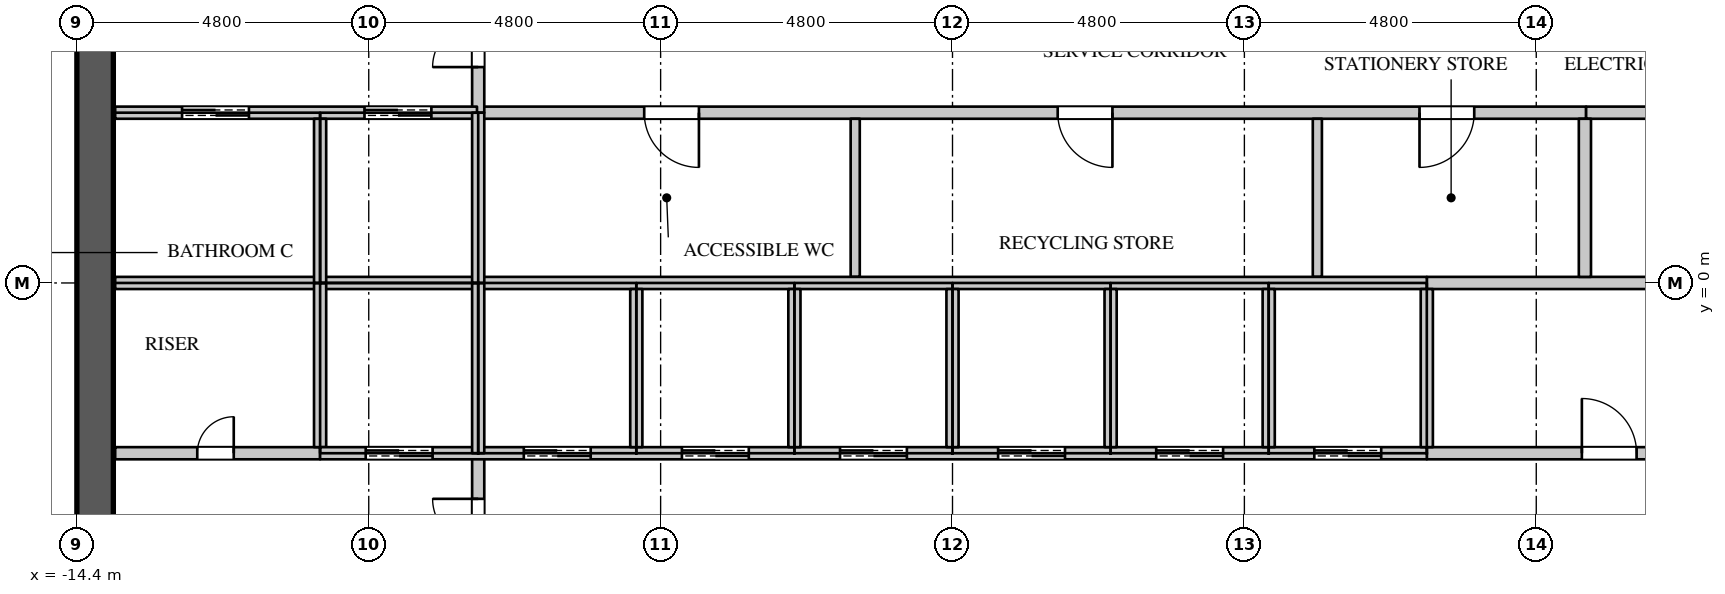
"""IFC4 building model, lengths in metres.
Left out: names, types, materials, properties, quantities, classifications, styles, units other than length and angle.
Written with IfcOpenShell. Run it as: python <this file> out.ifc"""

import sys

from ifc_helpers import new_model, si_unit, direction, frame, frame_2d, origin, place, context, subcontext, project, spatial, rectangle, extrude, element, fill, save


model = new_model("IFC4")
c1 = context("Model", 3, precision=1e-05, world=origin(), true_north=direction((0.0, 1.0)))
c2 = subcontext(c1, "Body", "Model", "MODEL_VIEW")
j1 = project(units=[si_unit("LENGTHUNIT", "METRE"), si_unit("PLANEANGLEUNIT", "RADIAN")], contexts=[c1])
p1 = place(None, origin())
s1 = spatial("IfcSite", under=j1, at=p1, CompositionType="ELEMENT")
p2 = place(p1, origin())
s2 = spatial("IfcBuilding", under=s1, at=p2, CompositionType="ELEMENT")
p3 = place(p2, frame((0.0, 0.0, 293.7)))
s3 = spatial("IfcBuildingStorey", under=s2, at=p3, CompositionType="ELEMENT", Elevation=293.7)
p4 = place(p3, frame((-14.1, -11.4, 0.0), z_axis=(0.0, 0.0, 1.0), x_axis=(0.0, 1.0, 0.0)))
e1 = element("IfcWall", 1, at=p4, inside=s3, PredefinedType="SHEAR", context=c2, shape_type="SweptSolid", body=[
    extrude(rectangle(XDim=22.8, YDim=0.6, at=frame_2d((11.4, 0.0))), origin(), (0.0, 0.0, 1.0), 4.2),
])
p5 = place(p4, frame((20.45, 0.0, 0.0)))
e2 = element("IfcOpeningElement", 2, at=p5, cuts=e1, PredefinedType="OPENING", context=c2, shape_type="SweptSolid", body=[
    extrude(rectangle(XDim=1.1, YDim=2.2, at=frame_2d((0.55, 1.1))), frame((0.0, 0.31, 0.0), z_axis=(0.0, -1.0, 0.0), x_axis=(1.0, 0.0, 0.0)), (0.0, 0.0, 1.0), 0.62),
])
p6 = place(p4, frame((1.25, 0.0, 0.0)))
e3 = element("IfcOpeningElement", 3, at=p6, cuts=e1, PredefinedType="OPENING", context=c2, shape_type="SweptSolid", body=[
    extrude(rectangle(XDim=1.1, YDim=2.2, at=frame_2d((0.55, 1.1))), frame((0.0, 0.31, 0.0), z_axis=(0.0, -1.0, 0.0), x_axis=(1.0, 0.0, 0.0)), (0.0, 0.0, 1.0), 0.62),
])
p7 = place(p4, frame((16.15, 0.0, 0.0)))
e4 = element("IfcOpeningElement", 4, at=p7, cuts=e1, PredefinedType="OPENING", context=c2, shape_type="SweptSolid", body=[
    extrude(rectangle(XDim=1.5, YDim=2.4, at=frame_2d((0.75, 1.2))), frame((0.0, 0.31, 0.0), z_axis=(0.0, -1.0, 0.0), x_axis=(1.0, 0.0, 0.0)), (0.0, 0.0, 1.0), 0.62),
])
p8 = place(p4, frame((5.15, 0.0, 0.0)))
e5 = element("IfcOpeningElement", 5, at=p8, cuts=e1, PredefinedType="OPENING", context=c2, shape_type="SweptSolid", body=[
    extrude(rectangle(XDim=1.5, YDim=2.4, at=frame_2d((0.75, 1.2))), frame((0.0, 0.31, 0.0), z_axis=(0.0, -1.0, 0.0), x_axis=(1.0, 0.0, 0.0)), (0.0, 0.0, 1.0), 0.62),
])
p9 = place(p3, frame((-7.82, 2.8, 0.0), z_axis=(0.0, 0.0, 1.0), x_axis=(1.0, 0.0, 0.0)))
e6 = element("IfcWall", 6, at=p9, inside=s3, PredefinedType="PARTITIONING", context=c2, shape_type="SweptSolid", body=[
    extrude(rectangle(XDim=18.24, YDim=0.2, at=frame_2d((9.12, 0.0))), origin(), (0.0, 0.0, 1.0), 3.95),
])
p10 = place(p9, frame((2.75, 0.0, 0.0)))
e7 = element("IfcOpeningElement", 7, at=p10, cuts=e6, PredefinedType="OPENING", context=c2, shape_type="SweptSolid", body=[
    extrude(rectangle(XDim=0.9, YDim=2.2, at=frame_2d((0.45, 1.1))), frame((0.0, 0.11, 0.0), z_axis=(0.0, -1.0, 0.0), x_axis=(1.0, 0.0, 0.0)), (0.0, 0.0, 1.0), 0.22),
])
p11 = place(p9, frame((9.55, 0.0, 0.0)))
e8 = element("IfcOpeningElement", 8, at=p11, cuts=e6, PredefinedType="OPENING", context=c2, shape_type="SweptSolid", body=[
    extrude(rectangle(XDim=0.9, YDim=2.2, at=frame_2d((0.45, 1.1))), frame((0.0, 0.11, 0.0), z_axis=(0.0, -1.0, 0.0), x_axis=(1.0, 0.0, 0.0)), (0.0, 0.0, 1.0), 0.22),
])
p12 = place(p9, frame((15.5, 0.0, 0.0)))
e9 = element("IfcOpeningElement", 9, at=p12, cuts=e6, PredefinedType="OPENING", context=c2, shape_type="SweptSolid", body=[
    extrude(rectangle(XDim=0.9, YDim=2.2, at=frame_2d((0.45, 1.1))), frame((0.0, 0.11, 0.0), z_axis=(0.0, -1.0, 0.0), x_axis=(1.0, 0.0, 0.0)), (0.0, 0.0, 1.0), 0.22),
])
p13 = place(p3, frame((-7.8, -5.8, 0.0), z_axis=(0.0, 0.0, 1.0), x_axis=(0.0, 1.0, 0.0)))
e10 = element("IfcWall", 10, at=p13, inside=s3, PredefinedType="PARTITIONING", context=c2, shape_type="SweptSolid", body=[
    extrude(rectangle(XDim=3.0, YDim=0.2, at=frame_2d((1.5, 0.0))), origin(), (0.0, 0.0, 1.0), 3.95),
])
p14 = place(p13, frame((0.75, 0.0, 0.0)))
e11 = element("IfcOpeningElement", 11, at=p14, cuts=e10, PredefinedType="OPENING", context=c2, shape_type="SweptSolid", body=[
    extrude(rectangle(XDim=1.5, YDim=2.4, at=frame_2d((0.75, 1.2))), frame((0.0, 0.11, 0.0), z_axis=(0.0, -1.0, 0.0), x_axis=(1.0, 0.0, 0.0)), (0.0, 0.0, 1.0), 0.22),
])
p15 = place(p3, frame((-7.8, 2.8, 0.0), z_axis=(0.0, 0.0, 1.0), x_axis=(0.0, 1.0, 0.0)))
e12 = element("IfcWall", 12, at=p15, inside=s3, PredefinedType="PARTITIONING", context=c2, shape_type="SweptSolid", body=[
    extrude(rectangle(XDim=5.275, YDim=0.2, at=frame_2d((2.637, 0.0))), origin(), (0.0, 0.0, 1.0), 3.95),
])
p16 = place(p15, frame((0.75, 0.0, 0.0)))
e13 = element("IfcOpeningElement", 13, at=p16, cuts=e12, PredefinedType="OPENING", context=c2, shape_type="SweptSolid", body=[
    extrude(rectangle(XDim=1.5, YDim=2.4, at=frame_2d((0.75, 1.2))), frame((0.0, 0.11, 0.0), z_axis=(0.0, -1.0, 0.0), x_axis=(1.0, 0.0, 0.0)), (0.0, 0.0, 1.0), 0.22),
])
for number, where, z_axis, x_axis in (
    (14, (-1.6, 0.1, 0.0), (0.0, 0.0, 1.0), (0.0, 1.0, 0.0)),
    (15, (6.0, 0.1, 0.0), (0.0, 0.0, 1.0), (0.0, 1.0, 0.0)),
):
    element("IfcWall", number, at=place(p3, frame(where, z_axis=z_axis, x_axis=x_axis)), inside=s3, PredefinedType="PARTITIONING", context=c2, shape_type="SweptSolid", body=[
        extrude(rectangle(XDim=2.6, YDim=0.15, at=frame_2d((1.3, 0.0))), origin(), (0.0, 0.0, 1.0), 3.95),
    ])
p17 = place(p3, frame((-13.77, -2.8, 0.0), z_axis=(0.0, 0.0, 1.0), x_axis=(1.0, 0.0, 0.0)))
e16 = element("IfcWall", 16, at=p17, inside=s3, PredefinedType="PARTITIONING", context=c2, shape_type="SweptSolid", body=[
    extrude(rectangle(XDim=3.37, YDim=0.2, at=frame_2d((1.685, 0.0))), origin(), (0.0, 0.0, 1.0), 3.95),
])
p18 = place(p17, frame((1.35, 0.0, 0.0)))
e17 = element("IfcOpeningElement", 17, at=p18, cuts=e16, PredefinedType="OPENING", context=c2, shape_type="SweptSolid", body=[
    extrude(rectangle(XDim=0.6, YDim=2.0, at=frame_2d((0.3, 1.0))), frame((0.0, 0.11, 0.0), z_axis=(0.0, -1.0, 0.0), x_axis=(1.0, 0.0, 0.0)), (0.0, 0.0, 1.0), 0.22),
])
p19 = place(p3, frame((7.8, -2.8, 0.0), z_axis=(0.0, 0.0, 1.0), x_axis=(1.0, 0.0, 0.0)))
e18 = element("IfcWall", 18, at=p19, inside=s3, PredefinedType="PARTITIONING", context=c2, shape_type="SweptSolid", body=[
    extrude(rectangle(XDim=5.97, YDim=0.2, at=frame_2d((2.985, 0.0))), origin(), (0.0, 0.0, 1.0), 3.95),
])
p20 = place(p19, frame((2.55, 0.0, 0.0)))
e19 = element("IfcOpeningElement", 19, at=p20, cuts=e18, PredefinedType="OPENING", context=c2, shape_type="SweptSolid", body=[
    extrude(rectangle(XDim=0.9, YDim=2.2, at=frame_2d((0.45, 1.1))), frame((0.0, 0.11, 0.0), z_axis=(0.0, -1.0, 0.0), x_axis=(1.0, 0.0, 0.0)), (0.0, 0.0, 1.0), 0.22),
])
p21 = place(p3, frame((7.8, 0.0, 0.0), z_axis=(0.0, 0.0, 1.0), x_axis=(1.0, 0.0, 0.0)))
e20 = element("IfcWall", 20, at=p21, inside=s3, PredefinedType="PARTITIONING", context=c2, shape_type="SweptSolid", body=[
    extrude(rectangle(XDim=5.97, YDim=0.2, at=frame_2d((2.985, 0.0))), origin(), (0.0, 0.0, 1.0), 3.95),
])
p22 = place(p3, frame((10.42, 2.8, 0.0), z_axis=(0.0, 0.0, 1.0), x_axis=(1.0, 0.0, 0.0)))
e21 = element("IfcWall", 21, at=p22, inside=s3, PredefinedType="PARTITIONING", context=c2, shape_type="SweptSolid", body=[
    extrude(rectangle(XDim=3.35, YDim=0.2, at=frame_2d((1.675, 0.0))), origin(), (0.0, 0.0, 1.0), 3.95),
])
p23 = place(p22, frame((1.35, 0.0, 0.0)))
e22 = element("IfcOpeningElement", 22, at=p23, cuts=e21, PredefinedType="OPENING", context=c2, shape_type="SweptSolid", body=[
    extrude(rectangle(XDim=0.6, YDim=2.0, at=frame_2d((0.3, 1.0))), frame((0.0, 0.11, 0.0), z_axis=(0.0, -1.0, 0.0), x_axis=(1.0, 0.0, 0.0)), (0.0, 0.0, 1.0), 0.22),
])
p24 = place(p3, frame((10.4, 0.1, 0.0), z_axis=(0.0, 0.0, 1.0), x_axis=(0.0, 1.0, 0.0)))
e23 = element("IfcWall", 23, at=p24, inside=s3, PredefinedType="PARTITIONING", context=c2, shape_type="SweptSolid", body=[
    extrude(rectangle(XDim=2.6, YDim=0.2, at=frame_2d((1.3, 0.0))), origin(), (0.0, 0.0, 1.0), 3.95),
])
p25 = place(p3, frame((-13.77, 0.0, 0.0), z_axis=(0.0, 0.0, 1.0), x_axis=(1.0, 0.0, 0.0)))
e24 = element("IfcWall", 24, at=p25, inside=s3, PredefinedType="PARTITIONING", context=c2, shape_type="SweptSolid", body=[
    extrude(rectangle(XDim=21.57, YDim=0.2, at=frame_2d((10.785, 0.0))), origin(), (0.0, 0.0, 1.0), 3.95),
])
p26 = place(p3, frame((-13.77, 2.8, 0.0), z_axis=(0.0, 0.0, 1.0), x_axis=(1.0, 0.0, 0.0)))
e25 = element("IfcWall", 25, at=p26, inside=s3, PredefinedType="PARTITIONING", context=c2, shape_type="SweptSolid", body=[
    extrude(rectangle(XDim=5.95, YDim=0.2, at=frame_2d((2.975, 0.0))), origin(), (0.0, 0.0, 1.0), 3.95),
])
p27 = place(p26, frame((1.1, 0.0, 0.0)))
e26 = element("IfcOpeningElement", 26, at=p27, cuts=e25, PredefinedType="OPENING", context=c2, shape_type="SweptSolid", body=[
    extrude(rectangle(XDim=1.1, YDim=2.2, at=frame_2d((0.55, 1.1))), frame((0.0, 0.11, 0.0), z_axis=(0.0, -1.0, 0.0), x_axis=(1.0, 0.0, 0.0)), (0.0, 0.0, 1.0), 0.22),
])
p28 = place(p26, frame((4.1, 0.0, 0.0)))
e27 = element("IfcOpeningElement", 27, at=p28, cuts=e25, PredefinedType="OPENING", context=c2, shape_type="SweptSolid", body=[
    extrude(rectangle(XDim=1.1, YDim=2.2, at=frame_2d((0.55, 1.1))), frame((0.0, 0.11, 0.0), z_axis=(0.0, -1.0, 0.0), x_axis=(1.0, 0.0, 0.0)), (0.0, 0.0, 1.0), 0.22),
])
p29 = place(p3, frame((-10.4, -2.7, 0.0), z_axis=(0.0, 0.0, 1.0), x_axis=(0.0, 1.0, 0.0)))
e28 = element("IfcWall", 28, at=p29, inside=s3, PredefinedType="PARTITIONING", context=c2, shape_type="SweptSolid", body=[
    extrude(rectangle(XDim=2.7, YDim=0.2, at=frame_2d((1.35, 0.0))), origin(), (0.0, 0.0, 1.0), 3.95),
])
p30 = place(p3, frame((-10.4, -2.8, 0.0), z_axis=(0.0, 0.0, 1.0), x_axis=(1.0, 0.0, 0.0)))
e29 = element("IfcWall", 29, at=p30, inside=s3, PredefinedType="PARTITIONING", context=c2, shape_type="SweptSolid", body=[
    extrude(rectangle(XDim=18.2, YDim=0.2, at=frame_2d((9.1, 0.0))), origin(), (0.0, 0.0, 1.0), 3.95),
])
p31 = place(p30, frame((0.75, 0.0, 0.0)))
e30 = element("IfcOpeningElement", 30, at=p31, cuts=e29, PredefinedType="OPENING", context=c2, shape_type="SweptSolid", body=[
    extrude(rectangle(XDim=1.1, YDim=2.2, at=frame_2d((0.55, 1.1))), frame((0.0, 0.11, 0.0), z_axis=(0.0, -1.0, 0.0), x_axis=(1.0, 0.0, 0.0)), (0.0, 0.0, 1.0), 0.22),
])
p32 = place(p30, frame((3.35, 0.0, 0.0)))
e31 = element("IfcOpeningElement", 31, at=p32, cuts=e29, PredefinedType="OPENING", context=c2, shape_type="SweptSolid", body=[
    extrude(rectangle(XDim=1.1, YDim=2.2, at=frame_2d((0.55, 1.1))), frame((0.0, 0.11, 0.0), z_axis=(0.0, -1.0, 0.0), x_axis=(1.0, 0.0, 0.0)), (0.0, 0.0, 1.0), 0.22),
])
p33 = place(p30, frame((5.95, 0.0, 0.0)))
e32 = element("IfcOpeningElement", 32, at=p33, cuts=e29, PredefinedType="OPENING", context=c2, shape_type="SweptSolid", body=[
    extrude(rectangle(XDim=1.1, YDim=2.2, at=frame_2d((0.55, 1.1))), frame((0.0, 0.11, 0.0), z_axis=(0.0, -1.0, 0.0), x_axis=(1.0, 0.0, 0.0)), (0.0, 0.0, 1.0), 0.22),
])
p34 = place(p30, frame((8.55, 0.0, 0.0)))
e33 = element("IfcOpeningElement", 33, at=p34, cuts=e29, PredefinedType="OPENING", context=c2, shape_type="SweptSolid", body=[
    extrude(rectangle(XDim=1.1, YDim=2.2, at=frame_2d((0.55, 1.1))), frame((0.0, 0.11, 0.0), z_axis=(0.0, -1.0, 0.0), x_axis=(1.0, 0.0, 0.0)), (0.0, 0.0, 1.0), 0.22),
])
p35 = place(p30, frame((11.15, 0.0, 0.0)))
e34 = element("IfcOpeningElement", 34, at=p35, cuts=e29, PredefinedType="OPENING", context=c2, shape_type="SweptSolid", body=[
    extrude(rectangle(XDim=1.1, YDim=2.2, at=frame_2d((0.55, 1.1))), frame((0.0, 0.11, 0.0), z_axis=(0.0, -1.0, 0.0), x_axis=(1.0, 0.0, 0.0)), (0.0, 0.0, 1.0), 0.22),
])
p36 = place(p30, frame((13.75, 0.0, 0.0)))
e35 = element("IfcOpeningElement", 35, at=p36, cuts=e29, PredefinedType="OPENING", context=c2, shape_type="SweptSolid", body=[
    extrude(rectangle(XDim=1.1, YDim=2.2, at=frame_2d((0.55, 1.1))), frame((0.0, 0.11, 0.0), z_axis=(0.0, -1.0, 0.0), x_axis=(1.0, 0.0, 0.0)), (0.0, 0.0, 1.0), 0.22),
])
p37 = place(p30, frame((16.35, 0.0, 0.0)))
e36 = element("IfcOpeningElement", 36, at=p37, cuts=e29, PredefinedType="OPENING", context=c2, shape_type="SweptSolid", body=[
    extrude(rectangle(XDim=1.1, YDim=2.2, at=frame_2d((0.55, 1.1))), frame((0.0, 0.11, 0.0), z_axis=(0.0, -1.0, 0.0), x_axis=(1.0, 0.0, 0.0)), (0.0, 0.0, 1.0), 0.22),
])
p38 = place(p3, frame((-10.4, 0.0, 0.0), z_axis=(0.0, 0.0, 1.0), x_axis=(0.0, 1.0, 0.0)))
e37 = element("IfcWall", 37, at=p38, inside=s3, PredefinedType="PARTITIONING", context=c2, shape_type="SweptSolid", body=[
    extrude(rectangle(XDim=2.7, YDim=0.2, at=frame_2d((1.35, 0.0))), origin(), (0.0, 0.0, 1.0), 3.95),
])
for number, where, z_axis, x_axis in (
    (38, (-7.8, -2.8, 0.0), (0.0, 0.0, 1.0), (0.0, 1.0, 0.0)),
    (39, (-7.8, 0.0, 0.0), (0.0, 0.0, 1.0), (0.0, 1.0, 0.0)),
):
    element("IfcWall", number, at=place(p3, frame(where, z_axis=z_axis, x_axis=x_axis)), inside=s3, PredefinedType="PARTITIONING", context=c2, shape_type="SweptSolid", body=[
        extrude(rectangle(XDim=2.8, YDim=0.2, at=frame_2d((1.4, 0.0))), origin(), (0.0, 0.0, 1.0), 3.95),
    ])
for number, where, z_axis, x_axis in (
    (40, (-5.2, -2.7, 0.0), (0.0, 0.0, 1.0), (0.0, 1.0, 0.0)),
    (41, (-2.6, -2.7, 0.0), (0.0, 0.0, 1.0), (0.0, 1.0, 0.0)),
    (42, (0.0, -2.7, 0.0), (0.0, 0.0, 1.0), (0.0, 1.0, 0.0)),
    (43, (2.6, -2.7, 0.0), (0.0, 0.0, 1.0), (0.0, 1.0, 0.0)),
    (44, (5.2, -2.7, 0.0), (0.0, 0.0, 1.0), (0.0, 1.0, 0.0)),
    (45, (7.8, -2.7, 0.0), (0.0, 0.0, 1.0), (0.0, 1.0, 0.0)),
):
    element("IfcWall", number, at=place(p3, frame(where, z_axis=z_axis, x_axis=x_axis)), inside=s3, PredefinedType="PARTITIONING", context=c2, shape_type="SweptSolid", body=[
        extrude(rectangle(XDim=2.6, YDim=0.2, at=frame_2d((1.3, 0.0))), origin(), (0.0, 0.0, 1.0), 3.95),
    ])
p39 = place(p18, origin())
e46 = element("IfcDoor", 46, at=p39, inside=s3, OperationType="SINGLE_SWING_RIGHT", PredefinedType="DOOR", context=c2, shape_type="SweptSolid", body=[
    extrude(rectangle(XDim=0.6, YDim=2.0, at=frame_2d((0.3, 1.0))), frame((0.0, 0.025, 0.0), z_axis=(0.0, -1.0, 0.0), x_axis=(1.0, 0.0, 0.0)), (0.0, 0.0, 1.0), 0.05),
])
fill(e17, e46)
p40 = place(p20, origin())
e47 = element("IfcDoor", 47, at=p40, inside=s3, OperationType="SINGLE_SWING_LEFT", PredefinedType="DOOR", context=c2, shape_type="SweptSolid", body=[
    extrude(rectangle(XDim=0.9, YDim=2.2, at=frame_2d((0.45, 1.1))), frame((0.0, 0.025, 0.0), z_axis=(0.0, -1.0, 0.0), x_axis=(1.0, 0.0, 0.0)), (0.0, 0.0, 1.0), 0.05),
])
fill(e19, e47)
p41 = place(p10, origin())
e48 = element("IfcDoor", 48, at=p41, inside=s3, OperationType="SINGLE_SWING_LEFT", PredefinedType="DOOR", context=c2, shape_type="SweptSolid", body=[
    extrude(rectangle(XDim=0.9, YDim=2.2, at=frame_2d((0.45, 1.1))), frame((0.0, 0.025, 0.0), z_axis=(0.0, -1.0, 0.0), x_axis=(1.0, 0.0, 0.0)), (0.0, 0.0, 1.0), 0.05),
])
fill(e7, e48)
p42 = place(p11, origin())
e49 = element("IfcDoor", 49, at=p42, inside=s3, OperationType="SINGLE_SWING_LEFT", PredefinedType="DOOR", context=c2, shape_type="SweptSolid", body=[
    extrude(rectangle(XDim=0.9, YDim=2.2, at=frame_2d((0.45, 1.1))), frame((0.0, 0.025, 0.0), z_axis=(0.0, -1.0, 0.0), x_axis=(1.0, 0.0, 0.0)), (0.0, 0.0, 1.0), 0.05),
])
fill(e8, e49)
p43 = place(p12, origin())
e50 = element("IfcDoor", 50, at=p43, inside=s3, OperationType="SINGLE_SWING_RIGHT", PredefinedType="DOOR", context=c2, shape_type="SweptSolid", body=[
    extrude(rectangle(XDim=0.9, YDim=2.2, at=frame_2d((0.45, 1.1))), frame((0.0, 0.025, 0.0), z_axis=(0.0, -1.0, 0.0), x_axis=(1.0, 0.0, 0.0)), (0.0, 0.0, 1.0), 0.05),
])
fill(e9, e50)
p44 = place(p27, origin())
e51 = element("IfcDoor", 51, at=p44, inside=s3, OperationType="DOUBLE_DOOR_SLIDING", PredefinedType="DOOR", context=c2, shape_type="SweptSolid", body=[
    extrude(rectangle(XDim=1.1, YDim=2.2, at=frame_2d((0.55, 1.1))), frame((0.0, 0.025, 0.0), z_axis=(0.0, -1.0, 0.0), x_axis=(1.0, 0.0, 0.0)), (0.0, 0.0, 1.0), 0.05),
])
fill(e26, e51)
p45 = place(p28, origin())
e52 = element("IfcDoor", 52, at=p45, inside=s3, OperationType="DOUBLE_DOOR_SLIDING", PredefinedType="DOOR", context=c2, shape_type="SweptSolid", body=[
    extrude(rectangle(XDim=1.1, YDim=2.2, at=frame_2d((0.55, 1.1))), frame((0.0, 0.025, 0.0), z_axis=(0.0, -1.0, 0.0), x_axis=(1.0, 0.0, 0.0)), (0.0, 0.0, 1.0), 0.05),
])
fill(e27, e52)
p46 = place(p31, origin())
e53 = element("IfcDoor", 53, at=p46, inside=s3, OperationType="DOUBLE_DOOR_SLIDING", PredefinedType="DOOR", context=c2, shape_type="SweptSolid", body=[
    extrude(rectangle(XDim=1.1, YDim=2.2, at=frame_2d((0.55, 1.1))), frame((0.0, 0.025, 0.0), z_axis=(0.0, -1.0, 0.0), x_axis=(1.0, 0.0, 0.0)), (0.0, 0.0, 1.0), 0.05),
])
fill(e30, e53)
p47 = place(p32, origin())
e54 = element("IfcDoor", 54, at=p47, inside=s3, OperationType="DOUBLE_DOOR_SLIDING", PredefinedType="DOOR", context=c2, shape_type="SweptSolid", body=[
    extrude(rectangle(XDim=1.1, YDim=2.2, at=frame_2d((0.55, 1.1))), frame((0.0, 0.025, 0.0), z_axis=(0.0, -1.0, 0.0), x_axis=(1.0, 0.0, 0.0)), (0.0, 0.0, 1.0), 0.05),
])
fill(e31, e54)
p48 = place(p33, origin())
e55 = element("IfcDoor", 55, at=p48, inside=s3, OperationType="DOUBLE_DOOR_SLIDING", PredefinedType="DOOR", context=c2, shape_type="SweptSolid", body=[
    extrude(rectangle(XDim=1.1, YDim=2.2, at=frame_2d((0.55, 1.1))), frame((0.0, 0.025, 0.0), z_axis=(0.0, -1.0, 0.0), x_axis=(1.0, 0.0, 0.0)), (0.0, 0.0, 1.0), 0.05),
])
fill(e32, e55)
p49 = place(p34, origin())
e56 = element("IfcDoor", 56, at=p49, inside=s3, OperationType="DOUBLE_DOOR_SLIDING", PredefinedType="DOOR", context=c2, shape_type="SweptSolid", body=[
    extrude(rectangle(XDim=1.1, YDim=2.2, at=frame_2d((0.55, 1.1))), frame((0.0, 0.025, 0.0), z_axis=(0.0, -1.0, 0.0), x_axis=(1.0, 0.0, 0.0)), (0.0, 0.0, 1.0), 0.05),
])
fill(e33, e56)
p50 = place(p35, origin())
e57 = element("IfcDoor", 57, at=p50, inside=s3, OperationType="DOUBLE_DOOR_SLIDING", PredefinedType="DOOR", context=c2, shape_type="SweptSolid", body=[
    extrude(rectangle(XDim=1.1, YDim=2.2, at=frame_2d((0.55, 1.1))), frame((0.0, 0.025, 0.0), z_axis=(0.0, -1.0, 0.0), x_axis=(1.0, 0.0, 0.0)), (0.0, 0.0, 1.0), 0.05),
])
fill(e34, e57)
p51 = place(p36, origin())
e58 = element("IfcDoor", 58, at=p51, inside=s3, OperationType="DOUBLE_DOOR_SLIDING", PredefinedType="DOOR", context=c2, shape_type="SweptSolid", body=[
    extrude(rectangle(XDim=1.1, YDim=2.2, at=frame_2d((0.55, 1.1))), frame((0.0, 0.025, 0.0), z_axis=(0.0, -1.0, 0.0), x_axis=(1.0, 0.0, 0.0)), (0.0, 0.0, 1.0), 0.05),
])
fill(e35, e58)
p52 = place(p37, origin())
e59 = element("IfcDoor", 59, at=p52, inside=s3, OperationType="DOUBLE_DOOR_SLIDING", PredefinedType="DOOR", context=c2, shape_type="SweptSolid", body=[
    extrude(rectangle(XDim=1.1, YDim=2.2, at=frame_2d((0.55, 1.1))), frame((0.0, 0.025, 0.0), z_axis=(0.0, -1.0, 0.0), x_axis=(1.0, 0.0, 0.0)), (0.0, 0.0, 1.0), 0.05),
])
fill(e36, e59)
p53 = place(p16, origin())
e60 = element("IfcDoor", 60, at=p53, inside=s3, OperationType="DOUBLE_DOOR_SINGLE_SWING", PredefinedType="DOOR", context=c2, shape_type="SweptSolid", body=[
    extrude(rectangle(XDim=1.5, YDim=2.4, at=frame_2d((0.75, 1.2))), frame((0.0, 0.025, 0.0), z_axis=(0.0, -1.0, 0.0), x_axis=(1.0, 0.0, 0.0)), (0.0, 0.0, 1.0), 0.05),
])
fill(e13, e60)
p54 = place(p14, origin())
e61 = element("IfcDoor", 61, at=p54, inside=s3, OperationType="DOUBLE_DOOR_SINGLE_SWING", PredefinedType="DOOR", context=c2, shape_type="SweptSolid", body=[
    extrude(rectangle(XDim=1.5, YDim=2.4, at=frame_2d((0.75, 1.2))), frame((0.0, 0.025, 0.0), z_axis=(0.0, -1.0, 0.0), x_axis=(1.0, 0.0, 0.0)), (0.0, 0.0, 1.0), 0.05),
])
fill(e11, e61)
save(model, sys.argv[1])
